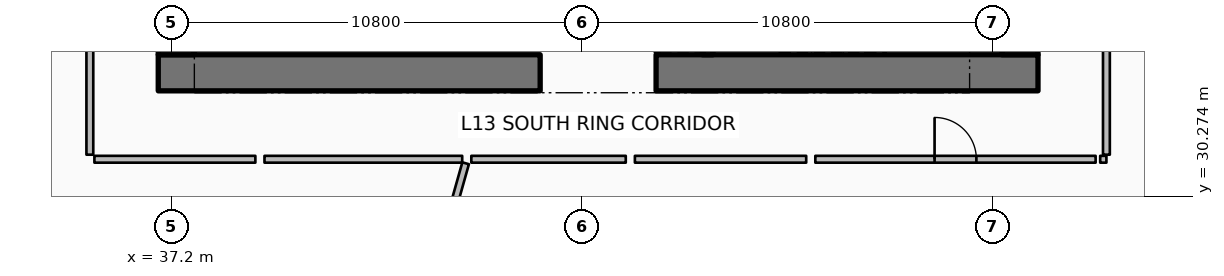
"""IFC4 building model, lengths in metres.
Left out: names, types, materials, properties, quantities, classifications, styles, units other than length and angle.
Written with IfcOpenShell. Run it as: python <this file> out.ifc"""

import sys

from ifc_helpers import new_model, si_unit, direction, frame, frame_2d, origin, place, context, subcontext, project, spatial, rectangle, extrude, element, fill, save


model = new_model("IFC4")
c1 = context("Model", 3, precision=1e-05, world=origin(), true_north=direction((0.0, 1.0)))
c2 = subcontext(c1, "Body", "Model", "MODEL_VIEW")
j1 = project(units=[si_unit("LENGTHUNIT", "METRE"), si_unit("PLANEANGLEUNIT", "RADIAN")], contexts=[c1])
p1 = place(None, origin())
s1 = spatial("IfcSite", under=j1, at=p1, CompositionType="ELEMENT")
p2 = place(p1, origin())
s2 = spatial("IfcBuilding", under=s1, at=p2, CompositionType="ELEMENT")
p3 = place(p2, frame((0.0, 0.0, 56.4)))
s3 = spatial("IfcBuildingStorey", under=s2, at=p3, CompositionType="ELEMENT", Elevation=56.4)
p4 = place(p3, frame((36.85, 33.525, 0.0), z_axis=(0.0, 0.0, 1.0), x_axis=(1.0, 0.0, 0.0)))
e1 = element("IfcWall", 1, at=p4, inside=s3, PredefinedType="SHEAR", context=c2, shape_type="SweptSolid", body=[
    extrude(rectangle(XDim=10.05, YDim=0.95, at=frame_2d((5.025, 0.0))), origin(), (0.0, 0.0, 1.0), 3.75),
])
p5 = place(p3, frame((49.95, 33.525, 0.0), z_axis=(0.0, 0.0, 1.0), x_axis=(1.0, 0.0, 0.0)))
e2 = element("IfcWall", 2, at=p5, inside=s3, PredefinedType="SHEAR", context=c2, shape_type="SweptSolid", body=[
    extrude(rectangle(XDim=10.05, YDim=0.95, at=frame_2d((5.025, 0.0))), origin(), (0.0, 0.0, 1.0), 3.75),
])
for number, where, z_axis, x_axis in (
    (3, (37.325, 34.0, 0.0), (0.0, 0.0, 1.0), (0.0, 1.0, 0.0)),
    (4, (59.525, 34.0, 0.0), (0.0, 0.0, 1.0), (0.0, 1.0, 0.0)),
):
    element("IfcWall", number, at=place(p3, frame(where, z_axis=z_axis, x_axis=x_axis)), inside=s3, PredefinedType="SHEAR", context=c2, shape_type="SweptSolid", body=[
        extrude(rectangle(XDim=16.0, YDim=0.95, at=frame_2d((8.0, 0.0))), origin(), (0.0, 0.0, 1.0), 3.75),
    ])
p6 = place(p3, frame((51.31, 34.0, 0.0), z_axis=(0.0, 0.0, 1.0), x_axis=(0.0, 1.0, 0.0)))
e5 = element("IfcWall", 5, at=p6, inside=s3, PredefinedType="SHEAR", context=c2, shape_type="SweptSolid", body=[
    extrude(rectangle(XDim=3.5, YDim=0.28, at=frame_2d((1.75, 0.0))), origin(), (0.0, 0.0, 1.0), 3.75),
])
p7 = place(p3, frame((44.938, 31.144, 0.0), z_axis=(0.0, 0.0, 1.0), x_axis=(-0.27143758514, -0.962456044385, 0.0)))
e6 = element("IfcWall", 6, at=p7, inside=s3, PredefinedType="PARTITIONING", context=c2, shape_type="SweptSolid", body=[
    extrude(rectangle(XDim=16.693, YDim=0.18, at=frame_2d((8.346, 0.0))), origin(), (0.0, 0.0, 1.0), 2.867),
])
p8 = place(p3, frame((61.906, 38.078, 0.0), z_axis=(0.0, 0.0, 1.0), x_axis=(0.962455862511, -0.271438230022, 0.0)))
e7 = element("IfcWall", 7, at=p8, inside=s3, PredefinedType="PARTITIONING", context=c2, shape_type="SweptSolid", body=[
    extrude(rectangle(XDim=16.126, YDim=0.18, at=frame_2d((8.063, 0.0))), origin(), (0.0, 0.0, 1.0), 2.867),
])
p9 = place(p3, frame((35.05, 34.628, 0.0), z_axis=(0.0, 0.0, 1.0), x_axis=(0.0, -1.0, 0.0)))
e8 = element("IfcWall", 8, at=p9, inside=s3, PredefinedType="PARTITIONING", context=c2, shape_type="SweptSolid", body=[
    extrude(rectangle(XDim=3.258, YDim=0.18, at=frame_2d((1.629, 0.0))), origin(), (0.0, 0.0, 1.0), 2.867),
])
p10 = place(p3, frame((35.17, 31.25, 0.0), z_axis=(0.0, 0.0, 1.0), x_axis=(1.0, 0.0, 0.0)))
e9 = element("IfcWall", 9, at=p10, inside=s3, PredefinedType="PARTITIONING", context=c2, shape_type="SweptSolid", body=[
    extrude(rectangle(XDim=4.236, YDim=0.18, at=frame_2d((2.118, 0.0))), origin(), (0.0, 0.0, 1.0), 2.867),
])
p11 = place(p3, frame((39.646, 31.25, 0.0), z_axis=(0.0, 0.0, 1.0), x_axis=(1.0, 0.0, 0.0)))
e10 = element("IfcWall", 10, at=p11, inside=s3, PredefinedType="PARTITIONING", context=c2, shape_type="SweptSolid", body=[
    extrude(rectangle(XDim=5.203, YDim=0.18, at=frame_2d((2.601, 0.0))), origin(), (0.0, 0.0, 1.0), 2.867),
])
p12 = place(p3, frame((54.14, 31.25, 0.0), z_axis=(0.0, 0.0, 1.0), x_axis=(1.0, 0.0, 0.0)))
e11 = element("IfcWall", 11, at=p12, inside=s3, PredefinedType="PARTITIONING", context=c2, shape_type="SweptSolid", body=[
    extrude(rectangle(XDim=7.376, YDim=0.18, at=frame_2d((3.688, 0.0))), origin(), (0.0, 0.0, 1.0), 2.867),
])
p13 = place(p12, frame((3.138, 0.0, 0.0)))
e12 = element("IfcOpeningElement", 12, at=p13, cuts=e11, PredefinedType="OPENING", context=c2, shape_type="SweptSolid", body=[
    extrude(rectangle(XDim=1.1, YDim=2.1, at=frame_2d((0.55, 1.05))), frame((0.0, 0.1, 0.0), z_axis=(0.0, -1.0, 0.0), x_axis=(1.0, 0.0, 0.0)), (0.0, 0.0, 1.0), 0.2),
])
p14 = place(p3, frame((45.088, 31.25, 0.0), z_axis=(0.0, 0.0, 1.0), x_axis=(1.0, 0.0, 0.0)))
e13 = element("IfcWall", 13, at=p14, inside=s3, PredefinedType="PARTITIONING", context=c2, shape_type="SweptSolid", body=[
    extrude(rectangle(XDim=4.064, YDim=0.18, at=frame_2d((2.032, 0.0))), origin(), (0.0, 0.0, 1.0), 2.867),
])
p15 = place(p3, frame((49.392, 31.25, 0.0), z_axis=(0.0, 0.0, 1.0), x_axis=(1.0, 0.0, 0.0)))
e14 = element("IfcWall", 14, at=p15, inside=s3, PredefinedType="PARTITIONING", context=c2, shape_type="SweptSolid", body=[
    extrude(rectangle(XDim=4.508, YDim=0.18, at=frame_2d((2.254, 0.0))), origin(), (0.0, 0.0, 1.0), 2.867),
])
p16 = place(p3, frame((61.636, 31.25, 0.0), z_axis=(0.0, 0.0, 1.0), x_axis=(1.0, 0.0, 0.0)))
e15 = element("IfcWall", 15, at=p16, inside=s3, PredefinedType="PARTITIONING", context=c2, shape_type="SweptSolid", body=[
    extrude(rectangle(XDim=0.164, YDim=0.18, at=frame_2d((0.082, 0.0))), origin(), (0.0, 0.0, 1.0), 2.867),
])
p17 = place(p3, frame((61.8, 31.37, 0.0), z_axis=(0.0, 0.0, 1.0), x_axis=(0.0, 1.0, 0.0)))
e16 = element("IfcWall", 16, at=p17, inside=s3, PredefinedType="PARTITIONING", context=c2, shape_type="SweptSolid", body=[
    extrude(rectangle(XDim=6.618, YDim=0.18, at=frame_2d((3.309, 0.0))), origin(), (0.0, 0.0, 1.0), 2.867),
])
p18 = place(p13, origin())
e17 = element("IfcDoor", 17, at=p18, inside=s3, OperationType="SINGLE_SWING_LEFT", PredefinedType="DOOR", context=c2, shape_type="SweptSolid", body=[
    extrude(rectangle(XDim=1.1, YDim=2.1, at=frame_2d((0.55, 1.05))), frame((0.0, 0.025, 0.0), z_axis=(0.0, -1.0, 0.0), x_axis=(1.0, 0.0, 0.0)), (0.0, 0.0, 1.0), 0.05),
])
fill(e12, e17)
save(model, sys.argv[1])
